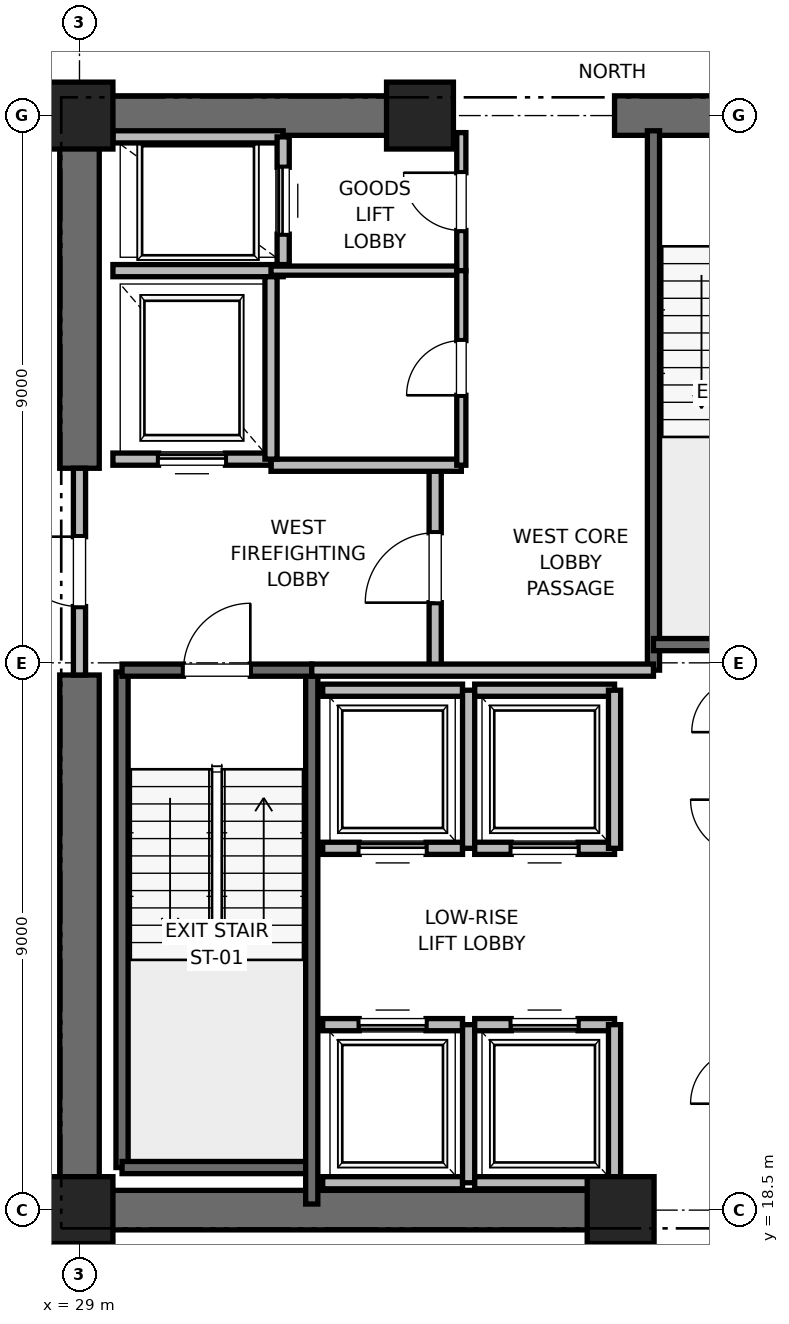
"""IFC4 building model, lengths in metres.
Left out: names, types, materials, properties, quantities, classifications, styles, units other than length and angle.
Written with IfcOpenShell. Run it as: python <this file> out.ifc"""

import sys

from ifc_helpers import new_model, si_unit, direction, frame, frame_2d, origin, origin_2d, place, context, subcontext, project, spatial, rectangle, extrude, element, fill, save


model = new_model("IFC4")
c1 = context("Model", 3, precision=1e-05, world=origin(), true_north=direction((0.0, 1.0)))
c2 = subcontext(c1, "Body", "Model", "MODEL_VIEW")
j1 = project(units=[si_unit("LENGTHUNIT", "METRE"), si_unit("PLANEANGLEUNIT", "RADIAN")], contexts=[c1])
p1 = place(None, origin())
s1 = spatial("IfcSite", under=j1, at=p1, CompositionType="ELEMENT")
p2 = place(p1, origin())
s2 = spatial("IfcBuilding", under=s1, at=p2, CompositionType="ELEMENT")
p3 = place(p2, frame((0.0, 0.0, 59.6)))
s3 = spatial("IfcBuildingStorey", under=s2, at=p3, CompositionType="ELEMENT", Elevation=59.6)
for number, where, z_axis, x_axis in (
    (1, (29.0, 18.5, 0.0), (0.0, 0.0, 1.0), (1.0, 0.0, 0.0)),
    (2, (29.0, 36.5, 0.0), (0.0, 0.0, 1.0), (1.0, 0.0, 0.0)),
    (3, (37.9, 18.5, 0.0), (0.0, 0.0, 1.0), (1.0, 0.0, 0.0)),
    (4, (34.6, 36.5, 0.0), (0.0, 0.0, 1.0), (1.0, 0.0, 0.0)),
):
    element("IfcColumn", number, at=place(p3, frame(where, z_axis=z_axis, x_axis=x_axis)), inside=s3, PredefinedType="PILASTER", context=c2, shape_type="SweptSolid", body=[
        extrude(rectangle(XDim=1.1, YDim=1.1, at=origin_2d()), origin(), (0.0, 0.0, 1.0), 4.0),
    ])
p4 = place(p3, frame((29.0, 18.5, 0.0), z_axis=(0.0, 0.0, 1.0), x_axis=(1.0, 0.0, 0.0)))
e5 = element("IfcWall", 5, at=p4, inside=s3, PredefinedType="SHEAR", context=c2, shape_type="SweptSolid", body=[
    extrude(rectangle(XDim=9.2, YDim=0.65, at=frame_2d((4.6, 0.0))), origin(), (0.0, 0.0, 1.0), 3.76),
])
p5 = place(p3, frame((29.0, 36.5, 0.0), z_axis=(0.0, 0.0, 1.0), x_axis=(1.0, 0.0, 0.0)))
e6 = element("IfcWall", 6, at=p5, inside=s3, PredefinedType="SHEAR", context=c2, shape_type="SweptSolid", body=[
    extrude(rectangle(XDim=5.8, YDim=0.65, at=frame_2d((2.9, 0.0))), origin(), (0.0, 0.0, 1.0), 3.76),
])
p6 = place(p3, frame((37.8, 36.5, 0.0), z_axis=(0.0, 0.0, 1.0), x_axis=(1.0, 0.0, 0.0)))
e7 = element("IfcWall", 7, at=p6, inside=s3, PredefinedType="SHEAR", context=c2, shape_type="SweptSolid", body=[
    extrude(rectangle(XDim=4.4, YDim=0.65, at=frame_2d((2.2, 0.0))), origin(), (0.0, 0.0, 1.0), 3.76),
])
p7 = place(p6, frame((1.65, 0.0, 0.0)))
e8 = element("IfcOpeningElement", 8, at=p7, cuts=e7, PredefinedType="OPENING", context=c2, shape_type="SweptSolid", body=[
    extrude(rectangle(XDim=1.1, YDim=2.15, at=frame_2d((0.55, 1.075))), frame((0.0, 0.325, 0.0), z_axis=(0.0, -1.0, 0.0), x_axis=(1.0, 0.0, 0.0)), (0.0, 0.0, 1.0), 0.65),
])
p8 = place(p3, frame((29.0, 18.5, 0.0), z_axis=(0.0, 0.0, 1.0), x_axis=(0.0, 1.0, 0.0)))
e9 = element("IfcWall", 9, at=p8, inside=s3, PredefinedType="SHEAR", context=c2, shape_type="SweptSolid", body=[
    extrude(rectangle(XDim=8.8, YDim=0.65, at=frame_2d((4.4, 0.0))), origin(), (0.0, 0.0, 1.0), 3.76),
])
p9 = place(p3, frame((29.0, 30.7, 0.0), z_axis=(0.0, 0.0, 1.0), x_axis=(0.0, 1.0, 0.0)))
e10 = element("IfcWall", 10, at=p9, inside=s3, PredefinedType="SHEAR", context=c2, shape_type="SweptSolid", body=[
    extrude(rectangle(XDim=5.8, YDim=0.65, at=frame_2d((2.9, 0.0))), origin(), (0.0, 0.0, 1.0), 3.76),
])
p10 = place(p3, frame((29.7, 19.2, 0.0), z_axis=(0.0, 0.0, 1.0), x_axis=(0.0, 1.0, 0.0)))
e11 = element("IfcWall", 11, at=p10, inside=s3, PredefinedType="SOLIDWALL", context=c2, shape_type="SweptSolid", body=[
    extrude(rectangle(XDim=8.15, YDim=0.2, at=frame_2d((4.075, 0.0))), origin(), (0.0, 0.0, 1.0), 3.76),
])
p11 = place(p3, frame((29.7, 19.2, 0.0), z_axis=(0.0, 0.0, 1.0), x_axis=(1.0, 0.0, 0.0)))
e12 = element("IfcWall", 12, at=p11, inside=s3, PredefinedType="SOLIDWALL", context=c2, shape_type="SweptSolid", body=[
    extrude(rectangle(XDim=3.12, YDim=0.2, at=frame_2d((1.56, 0.0))), origin(), (0.0, 0.0, 1.0), 3.76),
])
p12 = place(p3, frame((32.82, 18.6, 0.0), z_axis=(0.0, 0.0, 1.0), x_axis=(0.0, 1.0, 0.0)))
e13 = element("IfcWall", 13, at=p12, inside=s3, PredefinedType="SOLIDWALL", context=c2, shape_type="SweptSolid", body=[
    extrude(rectangle(XDim=8.78, YDim=0.2, at=frame_2d((4.39, 0.0))), origin(), (0.0, 0.0, 1.0), 3.76),
])
p13 = place(p3, frame((29.7, 27.38, 0.0), z_axis=(0.0, 0.0, 1.0), x_axis=(1.0, 0.0, 0.0)))
e14 = element("IfcWall", 14, at=p13, inside=s3, PredefinedType="SOLIDWALL", context=c2, shape_type="SweptSolid", body=[
    extrude(rectangle(XDim=3.12, YDim=0.2, at=frame_2d((1.56, 0.0))), origin(), (0.0, 0.0, 1.0), 3.76),
])
p14 = place(p13, frame((1.01, 0.0, 0.0)))
e15 = element("IfcOpeningElement", 15, at=p14, cuts=e14, PredefinedType="OPENING", context=c2, shape_type="SweptSolid", body=[
    extrude(rectangle(XDim=1.1, YDim=2.15, at=frame_2d((0.55, 1.075))), frame((0.0, 0.1, 0.0), z_axis=(0.0, -1.0, 0.0), x_axis=(1.0, 0.0, 0.0)), (0.0, 0.0, 1.0), 0.2),
])
p15 = place(p3, frame((38.44, 27.38, 0.0), z_axis=(0.0, 0.0, 1.0), x_axis=(0.0, 1.0, 0.0)))
e16 = element("IfcWall", 16, at=p15, inside=s3, PredefinedType="SOLIDWALL", context=c2, shape_type="SweptSolid", body=[
    extrude(rectangle(XDim=8.87, YDim=0.2, at=frame_2d((4.435, 0.0))), origin(), (0.0, 0.0, 1.0), 3.76),
])
p16 = place(p3, frame((38.44, 27.8, 0.0), z_axis=(0.0, 0.0, 1.0), x_axis=(1.0, 0.0, 0.0)))
e17 = element("IfcWall", 17, at=p16, inside=s3, PredefinedType="SOLIDWALL", context=c2, shape_type="SweptSolid", body=[
    extrude(rectangle(XDim=3.32, YDim=0.2, at=frame_2d((1.66, 0.0))), origin(), (0.0, 0.0, 1.0), 3.76),
])
p17 = place(p3, frame((34.85, 27.38, 0.0), z_axis=(0.0, 0.0, 1.0), x_axis=(0.0, 1.0, 0.0)))
e18 = element("IfcWall", 18, at=p17, inside=s3, PredefinedType="PARTITIONING", context=c2, shape_type="SweptSolid", body=[
    extrude(rectangle(XDim=3.37, YDim=0.2, at=frame_2d((1.685, 0.0))), origin(), (0.0, 0.0, 1.0), 3.76),
])
p18 = place(p17, frame((1.11, 0.0, 0.0)))
e19 = element("IfcOpeningElement", 19, at=p18, cuts=e18, PredefinedType="OPENING", context=c2, shape_type="SweptSolid", body=[
    extrude(rectangle(XDim=1.15, YDim=2.2, at=frame_2d((0.575, 1.1))), frame((0.0, 0.1, 0.0), z_axis=(0.0, -1.0, 0.0), x_axis=(1.0, 0.0, 0.0)), (0.0, 0.0, 1.0), 0.2),
])
p19 = place(p3, frame((29.0, 27.3, 0.0), z_axis=(0.0, 0.0, 1.0), x_axis=(0.0, 1.0, 0.0)))
e20 = element("IfcWall", 20, at=p19, inside=s3, PredefinedType="PARTITIONING", context=c2, shape_type="SweptSolid", body=[
    extrude(rectangle(XDim=3.4, YDim=0.2, at=frame_2d((1.7, 0.0))), origin(), (0.0, 0.0, 1.0), 2.54),
])
p20 = place(p19, frame((1.125, 0.0, 0.0)))
e21 = element("IfcOpeningElement", 21, at=p20, cuts=e20, PredefinedType="OPENING", context=c2, shape_type="SweptSolid", body=[
    extrude(rectangle(XDim=1.15, YDim=2.2, at=frame_2d((0.575, 1.1))), frame((0.0, 0.1, 0.0), z_axis=(0.0, -1.0, 0.0), x_axis=(1.0, 0.0, 0.0)), (0.0, 0.0, 1.0), 0.2),
])
p21 = place(p3, frame((32.82, 27.38, 0.0), z_axis=(0.0, 0.0, 1.0), x_axis=(1.0, 0.0, 0.0)))
e22 = element("IfcWall", 22, at=p21, inside=s3, PredefinedType="PARTITIONING", context=c2, shape_type="SweptSolid", body=[
    extrude(rectangle(XDim=5.62, YDim=0.2, at=frame_2d((2.81, 0.0))), origin(), (0.0, 0.0, 1.0), 3.76),
])
p22 = place(p3, frame((32.15, 30.75, 0.0), z_axis=(0.0, 0.0, 1.0), x_axis=(1.0, 0.0, 0.0)))
e23 = element("IfcWall", 23, at=p22, inside=s3, PredefinedType="PARTITIONING", context=c2, shape_type="SweptSolid", body=[
    extrude(rectangle(XDim=3.13, YDim=0.2, at=frame_2d((1.565, 0.0))), origin(), (0.0, 0.0, 1.0), 3.76),
])
p23 = place(p3, frame((29.55, 30.85, 0.0), z_axis=(0.0, 0.0, 1.0), x_axis=(1.0, 0.0, 0.0)))
e24 = element("IfcWall", 24, at=p23, inside=s3, PredefinedType="SOLIDWALL", context=c2, shape_type="SweptSolid", body=[
    extrude(rectangle(XDim=2.6, YDim=0.2, at=frame_2d((1.3, 0.0))), origin(), (0.0, 0.0, 1.0), 2.54),
])
p24 = place(p23, frame((0.75, 0.0, 0.0)))
e25 = element("IfcOpeningElement", 25, at=p24, cuts=e24, PredefinedType="OPENING", context=c2, shape_type="SweptSolid", body=[
    extrude(rectangle(XDim=1.1, YDim=2.2, at=frame_2d((0.55, 1.1))), frame((0.0, 0.1, 0.0), z_axis=(0.0, -1.0, 0.0), x_axis=(1.0, 0.0, 0.0)), (0.0, 0.0, 1.0), 0.2),
])
p25 = place(p3, frame((29.55, 33.95, 0.0), z_axis=(0.0, 0.0, 1.0), x_axis=(1.0, 0.0, 0.0)))
e26 = element("IfcWall", 26, at=p25, inside=s3, PredefinedType="SOLIDWALL", context=c2, shape_type="SweptSolid", body=[
    extrude(rectangle(XDim=2.8, YDim=0.2, at=frame_2d((1.4, 0.0))), origin(), (0.0, 0.0, 1.0), 3.76),
])
p26 = place(p3, frame((32.15, 30.85, 0.0), z_axis=(0.0, 0.0, 1.0), x_axis=(0.0, 1.0, 0.0)))
e27 = element("IfcWall", 27, at=p26, inside=s3, PredefinedType="SOLIDWALL", context=c2, shape_type="SweptSolid", body=[
    extrude(rectangle(XDim=3.0, YDim=0.2, at=frame_2d((1.5, 0.0))), origin(), (0.0, 0.0, 1.0), 3.76),
])
p27 = place(p3, frame((32.35, 36.15, 0.0), z_axis=(0.0, 0.0, 1.0), x_axis=(-1.0, 0.0, 0.0)))
e28 = element("IfcWall", 28, at=p27, inside=s3, PredefinedType="SOLIDWALL", context=c2, shape_type="SweptSolid", body=[
    extrude(rectangle(XDim=2.8, YDim=0.2, at=frame_2d((1.4, 0.0))), origin(), (0.0, 0.0, 1.0), 2.889),
])
p28 = place(p3, frame((32.35, 34.05, 0.0), z_axis=(0.0, 0.0, 1.0), x_axis=(0.0, 1.0, 0.0)))
e29 = element("IfcWall", 29, at=p28, inside=s3, PredefinedType="SOLIDWALL", context=c2, shape_type="SweptSolid", body=[
    extrude(rectangle(XDim=2.1, YDim=0.2, at=frame_2d((1.05, 0.0))), origin(), (0.0, 0.0, 1.0), 3.76),
])
p29 = place(p28, frame((0.5, 0.0, 0.0)))
e30 = element("IfcOpeningElement", 30, at=p29, cuts=e29, PredefinedType="OPENING", context=c2, shape_type="SweptSolid", body=[
    extrude(rectangle(XDim=1.1, YDim=2.2, at=frame_2d((0.55, 1.1))), frame((0.0, 0.1, 0.0), z_axis=(0.0, -1.0, 0.0), x_axis=(1.0, 0.0, 0.0)), (0.0, 0.0, 1.0), 0.2),
])
p30 = place(p3, frame((33.0, 18.95, 0.0), z_axis=(0.0, 0.0, 1.0), x_axis=(1.0, 0.0, 0.0)))
e31 = element("IfcWall", 31, at=p30, inside=s3, PredefinedType="SOLIDWALL", context=c2, shape_type="SweptSolid", body=[
    extrude(rectangle(XDim=2.3, YDim=0.2, at=frame_2d((1.15, 0.0))), origin(), (0.0, 0.0, 1.0), 3.76),
])
p31 = place(p3, frame((35.3, 21.55, 0.0), z_axis=(0.0, 0.0, 1.0), x_axis=(-1.0, 0.0, 0.0)))
e32 = element("IfcWall", 32, at=p31, inside=s3, PredefinedType="SOLIDWALL", context=c2, shape_type="SweptSolid", body=[
    extrude(rectangle(XDim=2.3, YDim=0.2, at=frame_2d((1.15, 0.0))), origin(), (0.0, 0.0, 1.0), 3.76),
])
p32 = place(p31, frame((0.6, 0.0, 0.0)))
e33 = element("IfcOpeningElement", 33, at=p32, cuts=e32, PredefinedType="OPENING", context=c2, shape_type="SweptSolid", body=[
    extrude(rectangle(XDim=1.1, YDim=2.2, at=frame_2d((0.55, 1.1))), frame((0.0, 0.1, 0.0), z_axis=(0.0, -1.0, 0.0), x_axis=(1.0, 0.0, 0.0)), (0.0, 0.0, 1.0), 0.2),
])
p33 = place(p3, frame((35.4, 18.95, 0.0), z_axis=(0.0, 0.0, 1.0), x_axis=(0.0, 1.0, 0.0)))
e34 = element("IfcWall", 34, at=p33, inside=s3, PredefinedType="SOLIDWALL", context=c2, shape_type="SweptSolid", body=[
    extrude(rectangle(XDim=2.6, YDim=0.2, at=frame_2d((1.3, 0.0))), origin(), (0.0, 0.0, 1.0), 3.76),
])
p34 = place(p3, frame((35.5, 18.95, 0.0), z_axis=(0.0, 0.0, 1.0), x_axis=(1.0, 0.0, 0.0)))
e35 = element("IfcWall", 35, at=p34, inside=s3, PredefinedType="SOLIDWALL", context=c2, shape_type="SweptSolid", body=[
    extrude(rectangle(XDim=2.3, YDim=0.2, at=frame_2d((1.15, 0.0))), origin(), (0.0, 0.0, 1.0), 2.54),
])
p35 = place(p3, frame((37.8, 21.55, 0.0), z_axis=(0.0, 0.0, 1.0), x_axis=(-1.0, 0.0, 0.0)))
e36 = element("IfcWall", 36, at=p35, inside=s3, PredefinedType="SOLIDWALL", context=c2, shape_type="SweptSolid", body=[
    extrude(rectangle(XDim=2.3, YDim=0.2, at=frame_2d((1.15, 0.0))), origin(), (0.0, 0.0, 1.0), 3.76),
])
p36 = place(p35, frame((0.6, 0.0, 0.0)))
e37 = element("IfcOpeningElement", 37, at=p36, cuts=e36, PredefinedType="OPENING", context=c2, shape_type="SweptSolid", body=[
    extrude(rectangle(XDim=1.1, YDim=2.2, at=frame_2d((0.55, 1.1))), frame((0.0, 0.1, 0.0), z_axis=(0.0, -1.0, 0.0), x_axis=(1.0, 0.0, 0.0)), (0.0, 0.0, 1.0), 0.2),
])
p37 = place(p3, frame((37.8, 18.95, 0.0), z_axis=(0.0, 0.0, 1.0), x_axis=(0.0, 1.0, 0.0)))
e38 = element("IfcWall", 38, at=p37, inside=s3, PredefinedType="SOLIDWALL", context=c2, shape_type="SweptSolid", body=[
    extrude(rectangle(XDim=2.6, YDim=0.2, at=frame_2d((1.3, 0.0))), origin(), (0.0, 0.0, 1.0), 2.54),
])
p38 = place(p3, frame((33.0, 24.45, 0.0), z_axis=(0.0, 0.0, 1.0), x_axis=(1.0, 0.0, 0.0)))
e39 = element("IfcWall", 39, at=p38, inside=s3, PredefinedType="SOLIDWALL", context=c2, shape_type="SweptSolid", body=[
    extrude(rectangle(XDim=2.3, YDim=0.2, at=frame_2d((1.15, 0.0))), origin(), (0.0, 0.0, 1.0), 3.76),
])
p39 = place(p38, frame((0.6, 0.0, 0.0)))
e40 = element("IfcOpeningElement", 40, at=p39, cuts=e39, PredefinedType="OPENING", context=c2, shape_type="SweptSolid", body=[
    extrude(rectangle(XDim=1.1, YDim=2.2, at=frame_2d((0.55, 1.1))), frame((0.0, 0.1, 0.0), z_axis=(0.0, -1.0, 0.0), x_axis=(1.0, 0.0, 0.0)), (0.0, 0.0, 1.0), 0.2),
])
p40 = place(p3, frame((35.3, 27.05, 0.0), z_axis=(0.0, 0.0, 1.0), x_axis=(-1.0, 0.0, 0.0)))
e41 = element("IfcWall", 41, at=p40, inside=s3, PredefinedType="SOLIDWALL", context=c2, shape_type="SweptSolid", body=[
    extrude(rectangle(XDim=2.3, YDim=0.2, at=frame_2d((1.15, 0.0))), origin(), (0.0, 0.0, 1.0), 3.76),
])
p41 = place(p3, frame((35.4, 24.45, 0.0), z_axis=(0.0, 0.0, 1.0), x_axis=(0.0, 1.0, 0.0)))
e42 = element("IfcWall", 42, at=p41, inside=s3, PredefinedType="SOLIDWALL", context=c2, shape_type="SweptSolid", body=[
    extrude(rectangle(XDim=2.6, YDim=0.2, at=frame_2d((1.3, 0.0))), origin(), (0.0, 0.0, 1.0), 3.76),
])
p42 = place(p3, frame((35.5, 24.45, 0.0), z_axis=(0.0, 0.0, 1.0), x_axis=(1.0, 0.0, 0.0)))
e43 = element("IfcWall", 43, at=p42, inside=s3, PredefinedType="SOLIDWALL", context=c2, shape_type="SweptSolid", body=[
    extrude(rectangle(XDim=2.3, YDim=0.2, at=frame_2d((1.15, 0.0))), origin(), (0.0, 0.0, 1.0), 3.76),
])
p43 = place(p42, frame((0.6, 0.0, 0.0)))
e44 = element("IfcOpeningElement", 44, at=p43, cuts=e43, PredefinedType="OPENING", context=c2, shape_type="SweptSolid", body=[
    extrude(rectangle(XDim=1.1, YDim=2.2, at=frame_2d((0.55, 1.1))), frame((0.0, 0.1, 0.0), z_axis=(0.0, -1.0, 0.0), x_axis=(1.0, 0.0, 0.0)), (0.0, 0.0, 1.0), 0.2),
])
p44 = place(p3, frame((37.8, 27.05, 0.0), z_axis=(0.0, 0.0, 1.0), x_axis=(-1.0, 0.0, 0.0)))
e45 = element("IfcWall", 45, at=p44, inside=s3, PredefinedType="SOLIDWALL", context=c2, shape_type="SweptSolid", body=[
    extrude(rectangle(XDim=2.3, YDim=0.2, at=frame_2d((1.15, 0.0))), origin(), (0.0, 0.0, 1.0), 3.76),
])
p45 = place(p3, frame((37.8, 24.45, 0.0), z_axis=(0.0, 0.0, 1.0), x_axis=(0.0, 1.0, 0.0)))
e46 = element("IfcWall", 46, at=p45, inside=s3, PredefinedType="SOLIDWALL", context=c2, shape_type="SweptSolid", body=[
    extrude(rectangle(XDim=2.6, YDim=0.2, at=frame_2d((1.3, 0.0))), origin(), (0.0, 0.0, 1.0), 3.76),
])
p46 = place(p3, frame((32.15, 33.95, 0.0), z_axis=(0.0, 0.0, 1.0), x_axis=(1.0, 0.0, 0.0)))
e47 = element("IfcWall", 47, at=p46, inside=s3, PredefinedType="PARTITIONING", context=c2, shape_type="SweptSolid", body=[
    extrude(rectangle(XDim=3.13, YDim=0.15, at=frame_2d((1.565, 0.0))), origin(), (0.0, 0.0, 1.0), 2.85),
])
p47 = place(p3, frame((35.28, 33.95, 0.0), z_axis=(0.0, 0.0, 1.0), x_axis=(0.0, 1.0, 0.0)))
e48 = element("IfcWall", 48, at=p47, inside=s3, PredefinedType="PARTITIONING", context=c2, shape_type="SweptSolid", body=[
    extrude(rectangle(XDim=2.27, YDim=0.15, at=frame_2d((1.135, 0.0))), origin(), (0.0, 0.0, 1.0), 2.54),
])
p48 = place(p47, frame((0.66, 0.0, 0.0)))
e49 = element("IfcOpeningElement", 49, at=p48, cuts=e48, PredefinedType="OPENING", context=c2, shape_type="SweptSolid", body=[
    extrude(rectangle(XDim=0.95, YDim=2.15, at=frame_2d((0.475, 1.075))), frame((0.0, 0.075, 0.0), z_axis=(0.0, -1.0, 0.0), x_axis=(1.0, 0.0, 0.0)), (0.0, 0.0, 1.0), 0.15),
])
p49 = place(p3, frame((35.28, 30.75, 0.0), z_axis=(0.0, 0.0, 1.0), x_axis=(0.0, 1.0, 0.0)))
e50 = element("IfcWall", 50, at=p49, inside=s3, PredefinedType="PARTITIONING", context=c2, shape_type="SweptSolid", body=[
    extrude(rectangle(XDim=3.2, YDim=0.15, at=frame_2d((1.6, 0.0))), origin(), (0.0, 0.0, 1.0), 2.85),
])
p50 = place(p49, frame((1.15, 0.0, 0.0)))
e51 = element("IfcOpeningElement", 51, at=p50, cuts=e50, PredefinedType="OPENING", context=c2, shape_type="SweptSolid", body=[
    extrude(rectangle(XDim=0.9, YDim=2.1, at=frame_2d((0.45, 1.05))), frame((0.0, 0.075, 0.0), z_axis=(0.0, -1.0, 0.0), x_axis=(1.0, 0.0, 0.0)), (0.0, 0.0, 1.0), 0.15),
])
p51 = place(p14, origin())
e52 = element("IfcDoor", 52, at=p51, inside=s3, OperationType="SINGLE_SWING_RIGHT", PredefinedType="DOOR", context=c2, shape_type="SweptSolid", body=[
    extrude(rectangle(XDim=1.1, YDim=2.15, at=frame_2d((0.55, 1.075))), frame((0.0, 0.025, 0.0), z_axis=(0.0, -1.0, 0.0), x_axis=(1.0, 0.0, 0.0)), (0.0, 0.0, 1.0), 0.05),
])
fill(e15, e52)
p52 = place(p18, origin())
e53 = element("IfcDoor", 53, at=p52, inside=s3, OperationType="SINGLE_SWING_LEFT", PredefinedType="DOOR", context=c2, shape_type="SweptSolid", body=[
    extrude(rectangle(XDim=1.15, YDim=2.2, at=frame_2d((0.575, 1.1))), frame((0.0, 0.025, 0.0), z_axis=(0.0, -1.0, 0.0), x_axis=(1.0, 0.0, 0.0)), (0.0, 0.0, 1.0), 0.05),
])
fill(e19, e53)
p53 = place(p20, origin())
e54 = element("IfcDoor", 54, at=p53, inside=s3, OperationType="SINGLE_SWING_RIGHT", PredefinedType="DOOR", context=c2, shape_type="SweptSolid", body=[
    extrude(rectangle(XDim=1.15, YDim=2.2, at=frame_2d((0.575, 1.1))), frame((0.0, 0.025, 0.0), z_axis=(0.0, -1.0, 0.0), x_axis=(1.0, 0.0, 0.0)), (0.0, 0.0, 1.0), 0.05),
])
fill(e21, e54)
p54 = place(p24, origin())
e55 = element("IfcDoor", 55, at=p54, inside=s3, OperationType="SLIDING_TO_RIGHT", PredefinedType="DOOR", context=c2, shape_type="SweptSolid", body=[
    extrude(rectangle(XDim=1.1, YDim=2.2, at=frame_2d((0.55, 1.1))), frame((0.0, 0.025, 0.0), z_axis=(0.0, -1.0, 0.0), x_axis=(1.0, 0.0, 0.0)), (0.0, 0.0, 1.0), 0.05),
])
fill(e25, e55)
p55 = place(p29, origin())
e56 = element("IfcDoor", 56, at=p55, inside=s3, OperationType="SLIDING_TO_RIGHT", PredefinedType="DOOR", context=c2, shape_type="SweptSolid", body=[
    extrude(rectangle(XDim=1.1, YDim=2.2, at=frame_2d((0.55, 1.1))), frame((0.0, 0.025, 0.0), z_axis=(0.0, -1.0, 0.0), x_axis=(1.0, 0.0, 0.0)), (0.0, 0.0, 1.0), 0.05),
])
fill(e30, e56)
p56 = place(p32, origin())
e57 = element("IfcDoor", 57, at=p56, inside=s3, OperationType="SLIDING_TO_RIGHT", PredefinedType="DOOR", context=c2, shape_type="SweptSolid", body=[
    extrude(rectangle(XDim=1.1, YDim=2.2, at=frame_2d((0.55, 1.1))), frame((0.0, 0.025, 0.0), z_axis=(0.0, -1.0, 0.0), x_axis=(1.0, 0.0, 0.0)), (0.0, 0.0, 1.0), 0.05),
])
fill(e33, e57)
p57 = place(p36, origin())
e58 = element("IfcDoor", 58, at=p57, inside=s3, OperationType="SLIDING_TO_RIGHT", PredefinedType="DOOR", context=c2, shape_type="SweptSolid", body=[
    extrude(rectangle(XDim=1.1, YDim=2.2, at=frame_2d((0.55, 1.1))), frame((0.0, 0.025, 0.0), z_axis=(0.0, -1.0, 0.0), x_axis=(1.0, 0.0, 0.0)), (0.0, 0.0, 1.0), 0.05),
])
fill(e37, e58)
p58 = place(p39, origin())
e59 = element("IfcDoor", 59, at=p58, inside=s3, OperationType="SLIDING_TO_RIGHT", PredefinedType="DOOR", context=c2, shape_type="SweptSolid", body=[
    extrude(rectangle(XDim=1.1, YDim=2.2, at=frame_2d((0.55, 1.1))), frame((0.0, 0.025, 0.0), z_axis=(0.0, -1.0, 0.0), x_axis=(1.0, 0.0, 0.0)), (0.0, 0.0, 1.0), 0.05),
])
fill(e40, e59)
p59 = place(p43, origin())
e60 = element("IfcDoor", 60, at=p59, inside=s3, OperationType="SLIDING_TO_RIGHT", PredefinedType="DOOR", context=c2, shape_type="SweptSolid", body=[
    extrude(rectangle(XDim=1.1, YDim=2.2, at=frame_2d((0.55, 1.1))), frame((0.0, 0.025, 0.0), z_axis=(0.0, -1.0, 0.0), x_axis=(1.0, 0.0, 0.0)), (0.0, 0.0, 1.0), 0.05),
])
fill(e44, e60)
p60 = place(p48, origin())
e61 = element("IfcDoor", 61, at=p60, inside=s3, OperationType="SINGLE_SWING_RIGHT", PredefinedType="DOOR", context=c2, shape_type="SweptSolid", body=[
    extrude(rectangle(XDim=0.95, YDim=2.15, at=frame_2d((0.475, 1.075))), frame((0.0, 0.025, 0.0), z_axis=(0.0, -1.0, 0.0), x_axis=(1.0, 0.0, 0.0)), (0.0, 0.0, 1.0), 0.05),
])
fill(e49, e61)
p61 = place(p50, origin())
e62 = element("IfcDoor", 62, at=p61, inside=s3, OperationType="SINGLE_SWING_LEFT", PredefinedType="DOOR", context=c2, shape_type="SweptSolid", body=[
    extrude(rectangle(XDim=0.9, YDim=2.1, at=frame_2d((0.45, 1.05))), frame((0.0, 0.025, 0.0), z_axis=(0.0, -1.0, 0.0), x_axis=(1.0, 0.0, 0.0)), (0.0, 0.0, 1.0), 0.05),
])
fill(e51, e62)
save(model, sys.argv[1])
